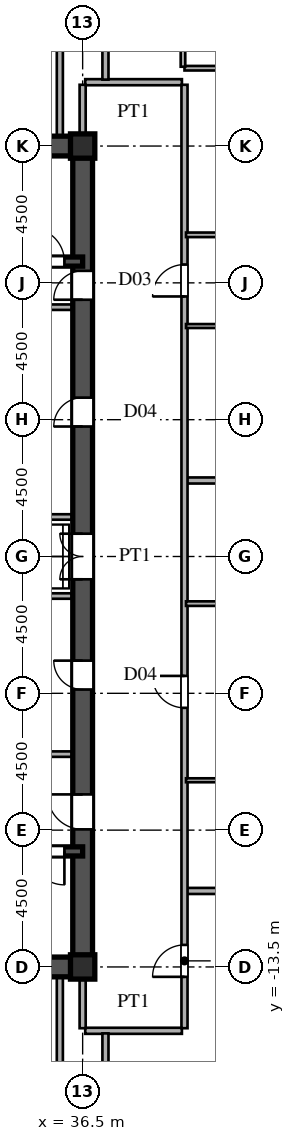
"""IFC4 building model, lengths in metres.
Left out: names, types, materials, properties, quantities, classifications, styles, units other than length and angle.
Written with IfcOpenShell. Run it as: python <this file> out.ifc"""

import sys

from ifc_helpers import new_model, si_unit, direction, frame, frame_2d, origin, origin_2d, place, context, subcontext, project, spatial, rectangle, i_section, extrude, source, transform, mapped, element, fill, save


model = new_model("IFC4")
c1 = context("Model", 3, precision=1e-05, world=origin(), true_north=direction((0.0, 1.0)))
c2 = subcontext(c1, "Body", "Model", "MODEL_VIEW")
j1 = project(units=[si_unit("LENGTHUNIT", "METRE"), si_unit("PLANEANGLEUNIT", "RADIAN")], contexts=[c1])
p1 = place(None, origin())
s1 = spatial("IfcSite", under=j1, at=p1, CompositionType="ELEMENT")
p2 = place(p1, origin())
s2 = spatial("IfcBuilding", under=s1, at=p2, CompositionType="ELEMENT")
p3 = place(p2, frame((0.0, 0.0, 106.8)))
s3 = spatial("IfcBuildingStorey", under=s2, at=p3, CompositionType="ELEMENT", Elevation=106.8)
m1 = source(origin(), c2, "Body", "SweptSolid", [
    extrude(i_section(OverallWidth=0.8, OverallDepth=0.8, WebThickness=0.032, FlangeThickness=0.05, at=origin_2d()), origin(), (0.0, 0.0, 1.0), 3.6),
])
for number, where, z_axis, x_axis in (
    (1, (36.5, -13.5, 0.0), (0.0, 0.0, 1.0), (1.0, 0.0, 0.0)),
    (2, (36.5, 13.5, 0.0), (0.0, 0.0, 1.0), (1.0, 0.0, 0.0)),
):
    element("IfcColumn", number, at=place(p3, frame(where, z_axis=z_axis, x_axis=x_axis)), inside=s3, PredefinedType="COLUMN", context=c2, shape_type="MappedRepresentation", body=[
        mapped(m1, transform((0.0, 0.0, 0.0), scale=1.0)),
    ])
for number, where, z_axis, x_axis in (
    (3, (27.5, -13.5, 0.0), (0.0, 0.0, 1.0), (1.0, 0.0, 0.0)),
    (4, (27.5, 13.5, 0.0), (0.0, 0.0, 1.0), (1.0, 0.0, 0.0)),
):
    element("IfcWall", number, at=place(p3, frame(where, z_axis=z_axis, x_axis=x_axis)), inside=s3, PredefinedType="SHEAR", context=c2, shape_type="SweptSolid", body=[
        extrude(rectangle(XDim=9.0, YDim=0.65, at=frame_2d((4.5, 0.0))), origin(), (0.0, 0.0, 1.0), 3.38),
    ])
p4 = place(p3, frame((36.5, -13.65, 0.0), z_axis=(0.0, 0.0, 1.0), x_axis=(0.0, 1.0, 0.0)))
e5 = element("IfcWall", 5, at=p4, inside=s3, PredefinedType="SHEAR", context=c2, shape_type="SweptSolid", body=[
    extrude(rectangle(XDim=7.15, YDim=0.65, at=frame_2d((3.575, 0.0))), origin(), (0.0, 0.0, 1.0), 3.38),
])
p5 = place(p4, frame((4.675, 0.0, 0.0)))
e6 = element("IfcOpeningElement", 6, at=p5, cuts=e5, PredefinedType="OPENING", context=c2, shape_type="SweptSolid", body=[
    extrude(rectangle(XDim=1.15, YDim=2.2, at=frame_2d((0.575, 1.1))), frame((0.0, 0.335, 0.0), z_axis=(0.0, -1.0, 0.0), x_axis=(1.0, 0.0, 0.0)), (0.0, 0.0, 1.0), 0.67),
])
p6 = place(p3, frame((36.5, -1.3, 0.0), z_axis=(0.0, 0.0, 1.0), x_axis=(0.0, 1.0, 0.0)))
e7 = element("IfcWall", 7, at=p6, inside=s3, PredefinedType="SHEAR", context=c2, shape_type="SweptSolid", body=[
    extrude(rectangle(XDim=2.6, YDim=0.65, at=frame_2d((1.3, 0.0))), origin(), (0.0, 0.0, 1.0), 3.38),
])
p7 = place(p6, frame((0.55, 0.0, 0.0)))
e8 = element("IfcOpeningElement", 8, at=p7, cuts=e7, PredefinedType="OPENING", context=c2, shape_type="SweptSolid", body=[
    extrude(rectangle(XDim=1.5, YDim=2.3, at=frame_2d((0.75, 1.15))), frame((0.0, 0.335, 0.0), z_axis=(0.0, -1.0, 0.0), x_axis=(1.0, 0.0, 0.0)), (0.0, 0.0, 1.0), 0.67),
])
p8 = place(p3, frame((36.5, 8.2, 0.0), z_axis=(0.0, 0.0, 1.0), x_axis=(0.0, 1.0, 0.0)))
e9 = element("IfcWall", 9, at=p8, inside=s3, PredefinedType="SHEAR", context=c2, shape_type="SweptSolid", body=[
    extrude(rectangle(XDim=5.45, YDim=0.65, at=frame_2d((2.725, 0.0))), origin(), (0.0, 0.0, 1.0), 3.38),
])
p9 = place(p8, frame((0.245, 0.0, 0.0)))
e10 = element("IfcOpeningElement", 10, at=p9, cuts=e9, PredefinedType="OPENING", context=c2, shape_type="SweptSolid", body=[
    extrude(rectangle(XDim=0.95, YDim=2.15, at=frame_2d((0.475, 1.075))), frame((0.0, 0.335, 0.0), z_axis=(0.0, -1.0, 0.0), x_axis=(1.0, 0.0, 0.0)), (0.0, 0.0, 1.0), 0.67),
])
p10 = place(p3, frame((36.5, -6.5, 0.0), z_axis=(0.0, 0.0, 1.0), x_axis=(0.0, 1.0, 0.0)))
e11 = element("IfcWall", 11, at=p10, inside=s3, PredefinedType="SHEAR", context=c2, shape_type="SweptSolid", body=[
    extrude(rectangle(XDim=5.2, YDim=0.65, at=frame_2d((2.6, 0.0))), origin(), (0.0, 0.0, 1.0), 3.38),
])
p11 = place(p10, frame((2.125, 0.0, 0.0)))
e12 = element("IfcOpeningElement", 12, at=p11, cuts=e11, PredefinedType="OPENING", context=c2, shape_type="SweptSolid", body=[
    extrude(rectangle(XDim=0.95, YDim=2.15, at=frame_2d((0.475, 1.075))), frame((0.0, 0.335, 0.0), z_axis=(0.0, -1.0, 0.0), x_axis=(1.0, 0.0, 0.0)), (0.0, 0.0, 1.0), 0.67),
])
p12 = place(p3, frame((36.5, 1.3, 0.0), z_axis=(0.0, 0.0, 1.0), x_axis=(0.0, 1.0, 0.0)))
e13 = element("IfcWall", 13, at=p12, inside=s3, PredefinedType="SHEAR", context=c2, shape_type="SweptSolid", body=[
    extrude(rectangle(XDim=6.9, YDim=0.65, at=frame_2d((3.45, 0.0))), origin(), (0.0, 0.0, 1.0), 3.38),
])
p13 = place(p12, frame((2.975, 0.0, 0.0)))
e14 = element("IfcOpeningElement", 14, at=p13, cuts=e13, PredefinedType="OPENING", context=c2, shape_type="SweptSolid", body=[
    extrude(rectangle(XDim=0.95, YDim=2.15, at=frame_2d((0.475, 1.075))), frame((0.0, 0.335, 0.0), z_axis=(0.0, -1.0, 0.0), x_axis=(1.0, 0.0, 0.0)), (0.0, 0.0, 1.0), 0.67),
])
p14 = place(p3, frame((27.5, -9.7, 0.0), z_axis=(0.0, 0.0, 1.0), x_axis=(1.0, 0.0, 0.0)))
e15 = element("IfcWall", 15, at=p14, inside=s3, PredefinedType="SHEAR", context=c2, shape_type="SweptSolid", body=[
    extrude(rectangle(XDim=9.0, YDim=0.3, at=frame_2d((4.5, 0.0))), origin(), (0.0, 0.0, 1.0), 3.38),
])
p15 = place(p14, frame((7.3, 0.0, 0.0)))
e16 = element("IfcOpeningElement", 16, at=p15, cuts=e15, PredefinedType="OPENING", context=c2, shape_type="SweptSolid", body=[
    extrude(rectangle(XDim=1.1, YDim=2.2, at=frame_2d((0.55, 1.1))), frame((0.0, 0.16, 0.0), z_axis=(0.0, -1.0, 0.0), x_axis=(1.0, 0.0, 0.0)), (0.0, 0.0, 1.0), 0.32),
])
p16 = place(p3, frame((27.5, 9.7, 0.0), z_axis=(0.0, 0.0, 1.0), x_axis=(1.0, 0.0, 0.0)))
e17 = element("IfcWall", 17, at=p16, inside=s3, PredefinedType="SHEAR", context=c2, shape_type="SweptSolid", body=[
    extrude(rectangle(XDim=9.0, YDim=0.3, at=frame_2d((4.5, 0.0))), origin(), (0.0, 0.0, 1.0), 3.38),
])
p17 = place(p16, frame((7.3, 0.0, 0.0)))
e18 = element("IfcOpeningElement", 18, at=p17, cuts=e17, PredefinedType="OPENING", context=c2, shape_type="SweptSolid", body=[
    extrude(rectangle(XDim=1.1, YDim=2.2, at=frame_2d((0.55, 1.1))), frame((0.0, 0.16, 0.0), z_axis=(0.0, -1.0, 0.0), x_axis=(1.0, 0.0, 0.0)), (0.0, 0.0, 1.0), 0.32),
])
for number, where, z_axis, x_axis in (
    (19, (30.45, -6.5, 0.0), (0.0, 0.0, 1.0), (1.0, 0.0, 0.0)),
    (20, (30.45, 8.2, 0.0), (0.0, 0.0, 1.0), (1.0, 0.0, 0.0)),
):
    element("IfcWall", number, at=place(p3, frame(where, z_axis=z_axis, x_axis=x_axis)), inside=s3, PredefinedType="PARTITIONING", context=c2, shape_type="SweptSolid", body=[
        extrude(rectangle(XDim=5.7, YDim=0.18, at=frame_2d((2.85, 0.0))), origin(), (0.0, 0.0, 1.0), 3.38),
    ])
for number, where, z_axis, x_axis in (
    (21, (33.2, -1.3, 0.0), (0.0, 0.0, 1.0), (1.0, 0.0, 0.0)),
    (22, (33.2, 1.3, 0.0), (0.0, 0.0, 1.0), (1.0, 0.0, 0.0)),
):
    element("IfcWall", number, at=place(p3, frame(where, z_axis=z_axis, x_axis=x_axis)), inside=s3, PredefinedType="PARTITIONING", context=c2, shape_type="SweptSolid", body=[
        extrude(rectangle(XDim=2.95, YDim=0.18, at=frame_2d((1.475, 0.0))), origin(), (0.0, 0.0, 1.0), 3.38),
    ])
p18 = place(p3, frame((36.585, -15.6, 0.0), z_axis=(0.0, 0.0, 1.0), x_axis=(1.0, 0.0, 0.0)))
e23 = element("IfcWall", 23, at=p18, inside=s3, PredefinedType="PARTITIONING", context=c2, shape_type="SweptSolid", body=[
    extrude(rectangle(XDim=3.18, YDim=0.2, at=frame_2d((1.59, 0.0))), origin(), (0.0, 0.0, 1.0), 3.38),
])
p19 = place(p3, frame((39.93, -11.0, 0.0), z_axis=(0.0, 0.0, 1.0), x_axis=(1.0, 0.0, 0.0)))
e24 = element("IfcWall", 24, at=p19, inside=s3, PredefinedType="PARTITIONING", context=c2, shape_type="SweptSolid", body=[
    extrude(rectangle(XDim=23.304, YDim=0.2, at=frame_2d((11.652, 0.0))), origin(), (0.0, 0.0, 1.0), 3.38),
])
p20 = place(p3, frame((39.9, -7.36, 0.0), z_axis=(0.0, 0.0, 1.0), x_axis=(1.0, 0.0, 0.0)))
e25 = element("IfcWall", 25, at=p20, inside=s3, PredefinedType="PARTITIONING", context=c2, shape_type="SweptSolid", body=[
    extrude(rectangle(XDim=5.55, YDim=0.13, at=frame_2d((2.775, 0.0))), origin(), (0.0, 0.0, 1.0), 3.38),
])
p21 = place(p20, frame((2.335, 0.0, 0.0)))
e26 = element("IfcOpeningElement", 26, at=p21, cuts=e25, PredefinedType="OPENING", context=c2, shape_type="SweptSolid", body=[
    extrude(rectangle(XDim=0.88, YDim=2.1, at=frame_2d((0.44, 1.05))), frame((0.0, 0.075, 0.0), z_axis=(0.0, -1.0, 0.0), x_axis=(1.0, 0.0, 0.0)), (0.0, 0.0, 1.0), 0.15),
])
p22 = place(p3, frame((39.9, -1.55, 0.0), z_axis=(0.0, 0.0, 1.0), x_axis=(1.0, 0.0, 0.0)))
e27 = element("IfcWall", 27, at=p22, inside=s3, PredefinedType="PARTITIONING", context=c2, shape_type="SweptSolid", body=[
    extrude(rectangle(XDim=5.55, YDim=0.15, at=frame_2d((2.775, 0.0))), origin(), (0.0, 0.0, 1.0), 3.38),
])
p23 = place(p22, frame((2.3, 0.0, 0.0)))
e28 = element("IfcOpeningElement", 28, at=p23, cuts=e27, PredefinedType="OPENING", context=c2, shape_type="SweptSolid", body=[
    extrude(rectangle(XDim=0.95, YDim=2.15, at=frame_2d((0.475, 1.075))), frame((0.0, 0.085, 0.0), z_axis=(0.0, -1.0, 0.0), x_axis=(1.0, 0.0, 0.0)), (0.0, 0.0, 1.0), 0.17),
])
p24 = place(p3, frame((39.93, 2.5, 0.0), z_axis=(0.0, 0.0, 1.0), x_axis=(1.0, 0.0, 0.0)))
e29 = element("IfcWall", 29, at=p24, inside=s3, PredefinedType="PARTITIONING", context=c2, shape_type="SweptSolid", body=[
    extrude(rectangle(XDim=31.075, YDim=0.2, at=frame_2d((15.538, 0.0))), origin(), (0.0, 0.0, 1.0), 3.38),
])
p25 = place(p3, frame((39.9, 7.58, 0.0), z_axis=(0.0, 0.0, 1.0), x_axis=(1.0, 0.0, 0.0)))
e30 = element("IfcWall", 30, at=p25, inside=s3, PredefinedType="PARTITIONING", context=c2, shape_type="SweptSolid", body=[
    extrude(rectangle(XDim=5.55, YDim=0.13, at=frame_2d((2.775, 0.0))), origin(), (0.0, 0.0, 1.0), 3.38),
])
p26 = place(p25, frame((2.335, 0.0, 0.0)))
e31 = element("IfcOpeningElement", 31, at=p26, cuts=e30, PredefinedType="OPENING", context=c2, shape_type="SweptSolid", body=[
    extrude(rectangle(XDim=0.88, YDim=2.1, at=frame_2d((0.44, 1.05))), frame((0.0, 0.075, 0.0), z_axis=(0.0, -1.0, 0.0), x_axis=(1.0, 0.0, 0.0)), (0.0, 0.0, 1.0), 0.15),
])
p27 = place(p3, frame((39.9, 10.58, 0.0), z_axis=(0.0, 0.0, 1.0), x_axis=(1.0, 0.0, 0.0)))
e32 = element("IfcWall", 32, at=p27, inside=s3, PredefinedType="PARTITIONING", context=c2, shape_type="SweptSolid", body=[
    extrude(rectangle(XDim=5.55, YDim=0.15, at=frame_2d((2.775, 0.0))), origin(), (0.0, 0.0, 1.0), 3.38),
])
p28 = place(p27, frame((2.3, 0.0, 0.0)))
e33 = element("IfcOpeningElement", 33, at=p28, cuts=e32, PredefinedType="OPENING", context=c2, shape_type="SweptSolid", body=[
    extrude(rectangle(XDim=0.95, YDim=2.15, at=frame_2d((0.475, 1.075))), frame((0.0, 0.085, 0.0), z_axis=(0.0, -1.0, 0.0), x_axis=(1.0, 0.0, 0.0)), (0.0, 0.0, 1.0), 0.17),
])
p29 = place(p3, frame((36.585, 15.6, 0.0), z_axis=(0.0, 0.0, 1.0), x_axis=(1.0, 0.0, 0.0)))
e34 = element("IfcWall", 34, at=p29, inside=s3, PredefinedType="PARTITIONING", context=c2, shape_type="SweptSolid", body=[
    extrude(rectangle(XDim=3.18, YDim=0.2, at=frame_2d((1.59, 0.0))), origin(), (0.0, 0.0, 1.0), 3.38),
])
p30 = place(p3, frame((39.85, 16.06, 0.0), z_axis=(0.0, 0.0, 1.0), x_axis=(1.0, 0.0, 0.0)))
e35 = element("IfcWall", 35, at=p30, inside=s3, PredefinedType="PARTITIONING", context=c2, shape_type="SweptSolid", body=[
    extrude(rectangle(XDim=5.6, YDim=0.15, at=frame_2d((2.8, 0.0))), origin(), (0.0, 0.0, 1.0), 3.38),
])
p31 = place(p30, frame((2.325, 0.0, 0.0)))
e36 = element("IfcOpeningElement", 36, at=p31, cuts=e35, PredefinedType="OPENING", context=c2, shape_type="SweptSolid", body=[
    extrude(rectangle(XDim=0.95, YDim=2.15, at=frame_2d((0.475, 1.075))), frame((0.0, 0.085, 0.0), z_axis=(0.0, -1.0, 0.0), x_axis=(1.0, 0.0, 0.0)), (0.0, 0.0, 1.0), 0.17),
])
for number, where, z_axis, x_axis in (
    (37, (35.75, -18.515, 0.0), (0.0, 0.0, 1.0), (0.0, 1.0, 0.0)),
    (38, (35.75, 13.83, 0.0), (0.0, 0.0, 1.0), (0.0, 1.0, 0.0)),
):
    element("IfcWall", number, at=place(p3, frame(where, z_axis=z_axis, x_axis=x_axis)), inside=s3, PredefinedType="PARTITIONING", context=c2, shape_type="SweptSolid", body=[
        extrude(rectangle(XDim=4.685, YDim=0.2, at=frame_2d((2.342, 0.0))), origin(), (0.0, 0.0, 1.0), 3.38),
    ])
for number, where, z_axis, x_axis in (
    (39, (36.5, -15.515, 0.0), (0.0, 0.0, 1.0), (0.0, 1.0, 0.0)),
    (40, (36.5, 13.83, 0.0), (0.0, 0.0, 1.0), (0.0, 1.0, 0.0)),
):
    element("IfcWall", number, at=place(p3, frame(where, z_axis=z_axis, x_axis=x_axis)), inside=s3, PredefinedType="PARTITIONING", context=c2, shape_type="SweptSolid", body=[
        extrude(rectangle(XDim=1.685, YDim=0.2, at=frame_2d((0.842, 0.0))), origin(), (0.0, 0.0, 1.0), 1.38),
    ])
for number, where, z_axis, x_axis in (
    (41, (37.25, -18.515, 0.0), (0.0, 0.0, 1.0), (0.0, 1.0, 0.0)),
    (42, (37.25, 15.685, 0.0), (0.0, 0.0, 1.0), (0.0, 1.0, 0.0)),
):
    element("IfcWall", number, at=place(p3, frame(where, z_axis=z_axis, x_axis=x_axis)), inside=s3, PredefinedType="PARTITIONING", context=c2, shape_type="SweptSolid", body=[
        extrude(rectangle(XDim=2.83, YDim=0.2, at=frame_2d((1.415, 0.0))), origin(), (0.0, 0.0, 1.0), 3.38),
    ])
p32 = place(p3, frame((39.8, 16.109, 0.0), z_axis=(0.0, 0.0, 1.0), x_axis=(0.0, 1.0, 0.0)))
e43 = element("IfcWall", 43, at=p32, inside=s3, PredefinedType="PARTITIONING", context=c2, shape_type="SweptSolid", body=[
    extrude(rectangle(XDim=5.466, YDim=0.15, at=frame_2d((2.733, 0.0))), origin(), (0.0, 0.0, 1.0), 3.38),
])
p33 = place(p32, frame((1.195, 0.0, 0.0)))
e44 = element("IfcOpeningElement", 44, at=p33, cuts=e43, PredefinedType="OPENING", context=c2, shape_type="SweptSolid", body=[
    extrude(rectangle(XDim=0.95, YDim=2.15, at=frame_2d((0.475, 1.075))), frame((0.0, 0.085, 0.0), z_axis=(0.0, -1.0, 0.0), x_axis=(1.0, 0.0, 0.0)), (0.0, 0.0, 1.0), 0.17),
])
p34 = place(p3, frame((39.85, -15.515, 0.0), z_axis=(0.0, 0.0, 1.0), x_axis=(0.0, 1.0, 0.0)))
e45 = element("IfcWall", 45, at=p34, inside=s3, PredefinedType="PARTITIONING", context=c2, shape_type="SweptSolid", body=[
    extrude(rectangle(XDim=31.03, YDim=0.2, at=frame_2d((15.515, 0.0))), origin(), (0.0, 0.0, 1.0), 3.38),
])
p35 = place(p34, frame((1.69, 0.0, 0.0)))
e46 = element("IfcOpeningElement", 46, at=p35, cuts=e45, PredefinedType="OPENING", context=c2, shape_type="SweptSolid", body=[
    extrude(rectangle(XDim=1.05, YDim=2.25, at=frame_2d((0.525, 1.125))), frame((0.0, 0.11, 0.0), z_axis=(0.0, -1.0, 0.0), x_axis=(1.0, 0.0, 0.0)), (0.0, 0.0, 1.0), 0.22),
])
p36 = place(p34, frame((10.538, 0.0, 0.0)))
e47 = element("IfcOpeningElement", 47, at=p36, cuts=e45, PredefinedType="OPENING", context=c2, shape_type="SweptSolid", body=[
    extrude(rectangle(XDim=1.05, YDim=2.25, at=frame_2d((0.525, 1.125))), frame((0.0, 0.11, 0.0), z_axis=(0.0, -1.0, 0.0), x_axis=(1.0, 0.0, 0.0)), (0.0, 0.0, 1.0), 0.22),
])
p37 = place(p34, frame((24.067, 0.0, 0.0)))
e48 = element("IfcOpeningElement", 48, at=p37, cuts=e45, PredefinedType="OPENING", context=c2, shape_type="SweptSolid", body=[
    extrude(rectangle(XDim=1.05, YDim=2.25, at=frame_2d((0.525, 1.125))), frame((0.0, 0.11, 0.0), z_axis=(0.0, -1.0, 0.0), x_axis=(1.0, 0.0, 0.0)), (0.0, 0.0, 1.0), 0.22),
])
m2 = source(origin(), c2, "Body", "SweptSolid", [
    extrude(rectangle(XDim=1.15, YDim=2.2, at=frame_2d((0.575, 1.1))), frame((0.0, 0.025, 0.0), z_axis=(0.0, -1.0, 0.0), x_axis=(1.0, 0.0, 0.0)), (0.0, 0.0, 1.0), 0.05),
])
p38 = place(p5, origin())
e49 = element("IfcDoor", 49, at=p38, inside=s3, OperationType="SINGLE_SWING_RIGHT", PredefinedType="DOOR", context=c2, shape_type="MappedRepresentation", body=[
    mapped(m2, transform((0.0, 0.0, 0.0), scale=1.0)),
])
fill(e6, e49)
m3 = source(origin(), c2, "Body", "SweptSolid", [
    extrude(rectangle(XDim=1.5, YDim=2.3, at=frame_2d((0.75, 1.15))), frame((0.0, 0.025, 0.0), z_axis=(0.0, -1.0, 0.0), x_axis=(1.0, 0.0, 0.0)), (0.0, 0.0, 1.0), 0.05),
])
p39 = place(p7, origin())
e50 = element("IfcDoor", 50, at=p39, inside=s3, OperationType="DOUBLE_SWING_LEFT", PredefinedType="DOOR", context=c2, shape_type="MappedRepresentation", body=[
    mapped(m3, transform((0.0, 0.0, 0.0), scale=1.0)),
])
fill(e8, e50)
m4 = source(origin(), c2, "Body", "SweptSolid", [
    extrude(rectangle(XDim=0.95, YDim=2.15, at=frame_2d((0.475, 1.075))), frame((0.0, 0.025, 0.0), z_axis=(0.0, -1.0, 0.0), x_axis=(1.0, 0.0, 0.0)), (0.0, 0.0, 1.0), 0.05),
])
p40 = place(p9, origin())
e51 = element("IfcDoor", 51, at=p40, inside=s3, OperationType="SINGLE_SWING_LEFT", PredefinedType="DOOR", context=c2, shape_type="MappedRepresentation", body=[
    mapped(m4, transform((0.0, 0.0, 0.0), scale=1.0)),
])
fill(e10, e51)
p41 = place(p11, origin())
e52 = element("IfcDoor", 52, at=p41, inside=s3, OperationType="SINGLE_SWING_RIGHT", PredefinedType="DOOR", context=c2, shape_type="MappedRepresentation", body=[
    mapped(m4, transform((0.0, 0.0, 0.0), scale=1.0)),
])
fill(e12, e52)
p42 = place(p13, origin())
e53 = element("IfcDoor", 53, at=p42, inside=s3, OperationType="SINGLE_SWING_LEFT", PredefinedType="DOOR", context=c2, shape_type="MappedRepresentation", body=[
    mapped(m4, transform((0.0, 0.0, 0.0), scale=1.0)),
])
fill(e14, e53)
m5 = source(origin(), c2, "Body", "SweptSolid", [
    extrude(rectangle(XDim=1.1, YDim=2.2, at=frame_2d((0.55, 1.1))), frame((0.0, 0.025, 0.0), z_axis=(0.0, -1.0, 0.0), x_axis=(1.0, 0.0, 0.0)), (0.0, 0.0, 1.0), 0.05),
])
p43 = place(p15, frame((1.1, 0.0, 0.0), z_axis=(0.0, 0.0, 1.0), x_axis=(-1.0, 0.0, 0.0)))
e54 = element("IfcDoor", 54, at=p43, inside=s3, OperationType="SINGLE_SWING_RIGHT", PredefinedType="DOOR", context=c2, shape_type="MappedRepresentation", body=[
    mapped(m5, transform((0.0, 0.0, 0.0), scale=1.0)),
])
fill(e16, e54)
p44 = place(p17, origin())
e55 = element("IfcDoor", 55, at=p44, inside=s3, OperationType="SINGLE_SWING_LEFT", PredefinedType="DOOR", context=c2, shape_type="MappedRepresentation", body=[
    mapped(m5, transform((0.0, 0.0, 0.0), scale=1.0)),
])
fill(e18, e55)
m6 = source(origin(), c2, "Body", "SweptSolid", [
    extrude(rectangle(XDim=1.05, YDim=2.25, at=frame_2d((0.525, 1.125))), frame((0.0, 0.025, 0.0), z_axis=(0.0, -1.0, 0.0), x_axis=(1.0, 0.0, 0.0)), (0.0, 0.0, 1.0), 0.05),
])
p45 = place(p35, origin())
e56 = element("IfcDoor", 56, at=p45, inside=s3, OperationType="SINGLE_SWING_LEFT", PredefinedType="DOOR", context=c2, shape_type="MappedRepresentation", body=[
    mapped(m6, transform((0.0, 0.0, 0.0), scale=1.0)),
])
fill(e46, e56)
p46 = place(p36, origin())
e57 = element("IfcDoor", 57, at=p46, inside=s3, OperationType="SINGLE_SWING_RIGHT", PredefinedType="DOOR", context=c2, shape_type="MappedRepresentation", body=[
    mapped(m6, transform((0.0, 0.0, 0.0), scale=1.0)),
])
fill(e47, e57)
p47 = place(p37, origin())
e58 = element("IfcDoor", 58, at=p47, inside=s3, OperationType="SINGLE_SWING_LEFT", PredefinedType="DOOR", context=c2, shape_type="MappedRepresentation", body=[
    mapped(m6, transform((0.0, 0.0, 0.0), scale=1.0)),
])
fill(e48, e58)
save(model, sys.argv[1])
